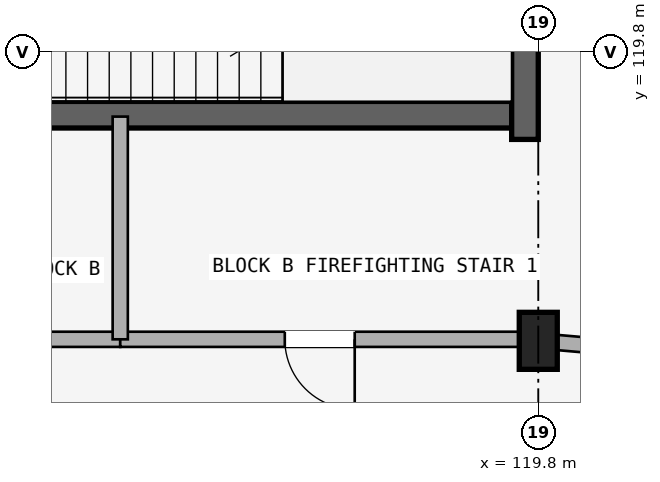
"""IFC4 building model, lengths in metres.
Left out: names, types, materials, properties, quantities, classifications, styles, units other than length and angle.
Written with IfcOpenShell. Run it as: python <this file> out.ifc"""

import sys

from ifc_helpers import new_model, si_unit, direction, frame, frame_2d, origin, origin_2d, place, context, subcontext, project, spatial, rectangle, extrude, element, fill, save


model = new_model("IFC4")
c1 = context("Model", 3, precision=1e-05, world=origin(), true_north=direction((0.0, 1.0)))
c2 = subcontext(c1, "Body", "Model", "MODEL_VIEW")
j1 = project(units=[si_unit("LENGTHUNIT", "METRE"), si_unit("PLANEANGLEUNIT", "RADIAN")], contexts=[c1])
p1 = place(None, origin())
s1 = spatial("IfcSite", under=j1, at=p1, CompositionType="ELEMENT")
p2 = place(p1, origin())
s2 = spatial("IfcBuilding", under=s1, at=p2, CompositionType="ELEMENT")
p3 = place(p2, frame((0.0, 0.0, 4.5)))
s3 = spatial("IfcBuildingStorey", under=s2, at=p3, CompositionType="ELEMENT", Elevation=4.5)
p4 = place(p3, frame((119.45, 118.975, 0.0), z_axis=(0.0, 0.0, 1.0), x_axis=(-1.0, 0.0, 0.0)))
e1 = element("IfcWall", 1, at=p4, inside=s3, PredefinedType="SHEAR", context=c2, shape_type="SweptSolid", body=[
    extrude(rectangle(XDim=8.075, YDim=0.35, at=frame_2d((4.038, 0.0))), origin(), (0.0, 0.0, 1.0), 3.98),
])
p5 = place(p4, frame((6.38, 0.0, 0.0)))
e2 = element("IfcOpeningElement", 2, at=p5, cuts=e1, PredefinedType="OPENING", context=c2, shape_type="SweptSolid", body=[
    extrude(rectangle(XDim=1.24, YDim=2.15, at=frame_2d((0.62, 1.075))), frame((0.0, 0.185, 0.0), z_axis=(0.0, -1.0, 0.0), x_axis=(1.0, 0.0, 0.0)), (0.0, 0.0, 1.0), 0.37),
])
p6 = place(p3, frame((119.625, 118.65, 0.0), z_axis=(0.0, 0.0, 1.0), x_axis=(0.0, 1.0, 0.0)))
e3 = element("IfcWall", 3, at=p6, inside=s3, PredefinedType="SHEAR", context=c2, shape_type="SweptSolid", body=[
    extrude(rectangle(XDim=3.6, YDim=0.35, at=frame_2d((1.8, 0.0))), origin(), (0.0, 0.0, 1.0), 3.98),
])
p7 = place(p3, frame((119.8, 116.0, 0.0), z_axis=(0.0, 0.0, 1.0), x_axis=(1.0, 0.0, 0.0)))
e4 = element("IfcColumn", 4, at=p7, inside=s3, PredefinedType="COLUMN", context=c2, shape_type="SweptSolid", body=[
    extrude(rectangle(XDim=0.5, YDim=0.75, at=origin_2d()), origin(), (0.0, 0.0, 1.0), 3.98),
])
p8 = place(p3, frame((114.3, 116.02, 0.0), z_axis=(0.0, 0.0, 1.0), x_axis=(-1.0, 0.0, 0.0)))
e5 = element("IfcWall", 5, at=p8, inside=s3, PredefinedType="STANDARD", context=c2, shape_type="SweptSolid", body=[
    extrude(rectangle(XDim=5.65, YDim=0.2, at=frame_2d((2.825, 0.0))), origin(), (0.0, 0.0, 1.0), 3.322),
])
p9 = place(p8, frame((1.923, 0.0, 0.0)))
e6 = element("IfcOpeningElement", 6, at=p9, cuts=e5, PredefinedType="OPENING", context=c2, shape_type="SweptSolid", body=[
    extrude(rectangle(XDim=1.24, YDim=2.15, at=frame_2d((0.62, 1.075))), frame((0.0, 0.11, 0.0), z_axis=(0.0, -1.0, 0.0), x_axis=(1.0, 0.0, 0.0)), (0.0, 0.0, 1.0), 0.22),
])
p10 = place(p3, frame((119.55, 116.02, 0.0), z_axis=(0.0, 0.0, 1.0), x_axis=(-1.0, 0.0, 0.0)))
e7 = element("IfcWall", 7, at=p10, inside=s3, PredefinedType="STANDARD", context=c2, shape_type="SweptSolid", body=[
    extrude(rectangle(XDim=5.25, YDim=0.2, at=frame_2d((2.625, 0.0))), origin(), (0.0, 0.0, 1.0), 3.322),
])
p11 = place(p10, frame((2.165, 0.0, 0.0)))
e8 = element("IfcOpeningElement", 8, at=p11, cuts=e7, PredefinedType="OPENING", context=c2, shape_type="SweptSolid", body=[
    extrude(rectangle(XDim=0.92, YDim=2.1, at=frame_2d((0.46, 1.05))), frame((0.0, 0.11, 0.0), z_axis=(0.0, -1.0, 0.0), x_axis=(1.0, 0.0, 0.0)), (0.0, 0.0, 1.0), 0.22),
])
p12 = place(p3, frame((114.3, 116.02, 0.0), z_axis=(0.0, 0.0, 1.0), x_axis=(0.0, 1.0, 0.0)))
e9 = element("IfcWall", 9, at=p12, inside=s3, PredefinedType="STANDARD", context=c2, shape_type="SweptSolid", body=[
    extrude(rectangle(XDim=2.93, YDim=0.2, at=frame_2d((1.465, 0.0))), origin(), (0.0, 0.0, 1.0), 3.322),
])
p13 = place(p3, frame((119.8, 116.0, 0.0), z_axis=(0.0, 0.0, 1.0), x_axis=(0.996193663584, -0.087167566415, 0.0)))
e10 = element("IfcWall", 10, at=p13, inside=s3, PredefinedType="STANDARD", context=c2, shape_type="SweptSolid", body=[
    extrude(rectangle(XDim=4.916, YDim=0.2, at=frame_2d((2.458, 0.0))), origin(), (0.0, 0.0, 1.0), 3.322),
])
p14 = place(p13, frame((1.888, 0.0, 0.0)))
e11 = element("IfcOpeningElement", 11, at=p14, cuts=e10, PredefinedType="OPENING", context=c2, shape_type="SweptSolid", body=[
    extrude(rectangle(XDim=1.14, YDim=2.15, at=frame_2d((0.57, 1.075))), frame((0.0, 0.11, 0.0), z_axis=(0.0, -1.0, 0.0), x_axis=(1.0, 0.0, 0.0)), (0.0, 0.0, 1.0), 0.22),
])
p15 = place(p11, origin())
e12 = element("IfcDoor", 12, at=p15, inside=s3, OperationType="SINGLE_SWING_LEFT", PredefinedType="DOOR", context=c2, shape_type="SweptSolid", body=[
    extrude(rectangle(XDim=0.92, YDim=2.1, at=frame_2d((0.46, 1.05))), frame((0.0, 0.025, 0.0), z_axis=(0.0, -1.0, 0.0), x_axis=(1.0, 0.0, 0.0)), (0.0, 0.0, 1.0), 0.05),
])
fill(e8, e12)
save(model, sys.argv[1])
